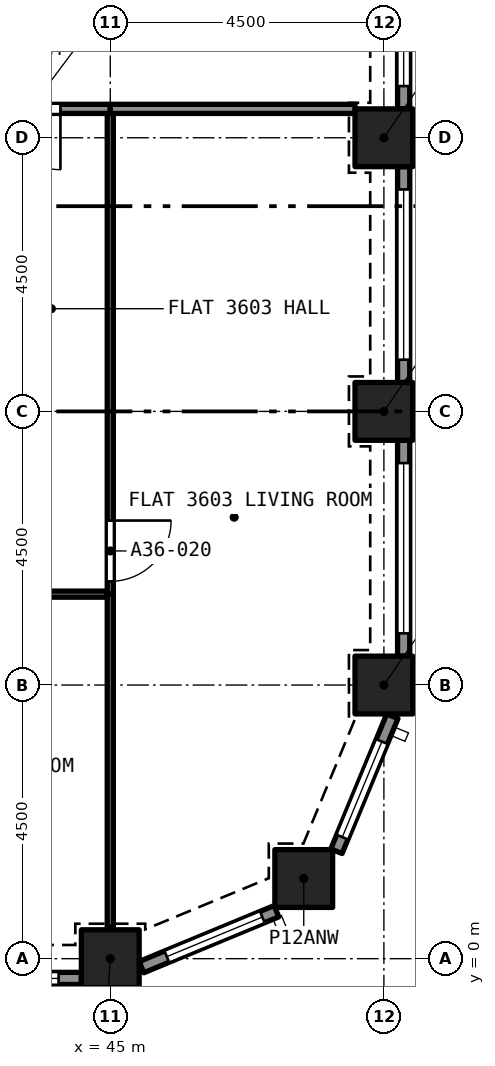
"""IFC4 building model, lengths in metres.
Left out: names, types, materials, properties, quantities, classifications, styles, units other than length and angle.
Written with IfcOpenShell. Run it as: python <this file> out.ifc"""

import sys

from ifc_helpers import new_model, si_unit, direction, frame, frame_2d, origin, origin_2d, place, context, subcontext, project, spatial, rectangle, extrude, element, fill, save


model = new_model("IFC4")
c1 = context("Model", 3, precision=1e-05, world=origin(), true_north=direction((0.0, 1.0)))
c2 = subcontext(c1, "Body", "Model", "MODEL_VIEW")
j1 = project(units=[si_unit("LENGTHUNIT", "METRE"), si_unit("PLANEANGLEUNIT", "RADIAN")], contexts=[c1])
p1 = place(None, origin())
s1 = spatial("IfcSite", under=j1, at=p1, CompositionType="ELEMENT")
p2 = place(p1, origin())
s2 = spatial("IfcBuilding", under=s1, at=p2, CompositionType="ELEMENT")
p3 = place(p2, frame((0.0, 0.0, 130.2)))
s3 = spatial("IfcBuildingStorey", under=s2, at=p3, CompositionType="ELEMENT", Elevation=130.2)
for number, where, z_axis, x_axis in (
    (1, (45.0, 0.0, 0.0), (0.0, 0.0, 1.0), (1.0, 0.0, 0.0)),
    (2, (48.182, 1.318, 0.0), (0.0, 0.0, 1.0), (1.0, 0.0, 0.0)),
    (3, (49.5, 4.5, 0.0), (0.0, 0.0, 1.0), (1.0, 0.0, 0.0)),
    (4, (49.5, 9.0, 0.0), (0.0, 0.0, 1.0), (1.0, 0.0, 0.0)),
    (5, (49.5, 13.5, 0.0), (0.0, 0.0, 1.0), (1.0, 0.0, 0.0)),
):
    element("IfcColumn", number, at=place(p3, frame(where, z_axis=z_axis, x_axis=x_axis)), inside=s3, PredefinedType="COLUMN", context=c2, shape_type="SweptSolid", body=[
        extrude(rectangle(XDim=0.95, YDim=0.95, at=origin_2d()), origin(), (0.0, 0.0, 1.0), 3.2),
    ])
p4 = place(p3, frame((44.525, -0.325, 0.0), z_axis=(0.0, 0.0, 1.0), x_axis=(-1.0, 0.0, 0.0)))
e6 = element("IfcWall", 6, at=p4, inside=s3, PredefinedType="SOLIDWALL", context=c2, shape_type="SweptSolid", body=[
    extrude(rectangle(XDim=3.55, YDim=0.2, at=frame_2d((1.775, 0.0))), origin(), (0.0, 0.0, 1.0), 3.2),
])
p5 = place(p4, frame((0.375, 0.0, 0.45)))
e7 = element("IfcOpeningElement", 7, at=p5, cuts=e6, PredefinedType="OPENING", context=c2, shape_type="SweptSolid", body=[
    extrude(rectangle(XDim=2.8, YDim=1.95, at=frame_2d((1.4, 0.975))), frame((0.0, 0.11, 0.0), z_axis=(0.0, -1.0, 0.0), x_axis=(1.0, 0.0, 0.0)), (0.0, 0.0, 1.0), 0.22),
])
p6 = place(p3, frame((47.733, 0.78, 0.0), z_axis=(0.0, 0.0, 1.0), x_axis=(-0.923880599843, -0.382680855588, 0.0)))
e8 = element("IfcWall", 8, at=p6, inside=s3, PredefinedType="SOLIDWALL", context=c2, shape_type="SweptSolid", body=[
    extrude(rectangle(XDim=2.403, YDim=0.2, at=frame_2d((1.201, 0.0))), origin(), (0.0, 0.0, 1.0), 3.2),
])
p7 = place(p6, frame((0.251, 0.0, 0.45)))
e9 = element("IfcOpeningElement", 9, at=p7, cuts=e8, PredefinedType="OPENING", context=c2, shape_type="SweptSolid", body=[
    extrude(rectangle(XDim=1.7, YDim=1.95, at=frame_2d((0.85, 0.975))), frame((0.0, 0.11, 0.0), z_axis=(0.0, -1.0, 0.0), x_axis=(1.0, 0.0, 0.0)), (0.0, 0.0, 1.0), 0.22),
])
p8 = place(p3, frame((49.639, 3.987, 0.0), z_axis=(0.0, 0.0, 1.0), x_axis=(-0.382680855588, -0.923880599843, 0.0)))
e10 = element("IfcWall", 10, at=p8, inside=s3, PredefinedType="SOLIDWALL", context=c2, shape_type="SweptSolid", body=[
    extrude(rectangle(XDim=2.403, YDim=0.2, at=frame_2d((1.201, 0.0))), origin(), (0.0, 0.0, 1.0), 3.2),
])
p9 = place(p8, frame((0.451, 0.0, 0.45)))
e11 = element("IfcOpeningElement", 11, at=p9, cuts=e10, PredefinedType="OPENING", context=c2, shape_type="SweptSolid", body=[
    extrude(rectangle(XDim=1.7, YDim=1.95, at=frame_2d((0.85, 0.975))), frame((0.0, 0.11, 0.0), z_axis=(0.0, -1.0, 0.0), x_axis=(1.0, 0.0, 0.0)), (0.0, 0.0, 1.0), 0.22),
])
p10 = place(p3, frame((49.825, 8.525, 0.0), z_axis=(0.0, 0.0, 1.0), x_axis=(0.0, -1.0, 0.0)))
e12 = element("IfcWall", 12, at=p10, inside=s3, PredefinedType="SOLIDWALL", context=c2, shape_type="SweptSolid", body=[
    extrude(rectangle(XDim=3.55, YDim=0.2, at=frame_2d((1.775, 0.0))), origin(), (0.0, 0.0, 1.0), 3.2),
])
p11 = place(p10, frame((0.375, 0.0, 0.45)))
e13 = element("IfcOpeningElement", 13, at=p11, cuts=e12, PredefinedType="OPENING", context=c2, shape_type="SweptSolid", body=[
    extrude(rectangle(XDim=2.8, YDim=1.95, at=frame_2d((1.4, 0.975))), frame((0.0, 0.11, 0.0), z_axis=(0.0, -1.0, 0.0), x_axis=(1.0, 0.0, 0.0)), (0.0, 0.0, 1.0), 0.22),
])
p12 = place(p3, frame((49.825, 13.025, 0.0), z_axis=(0.0, 0.0, 1.0), x_axis=(0.0, -1.0, 0.0)))
e14 = element("IfcWall", 14, at=p12, inside=s3, PredefinedType="SOLIDWALL", context=c2, shape_type="SweptSolid", body=[
    extrude(rectangle(XDim=3.55, YDim=0.2, at=frame_2d((1.775, 0.0))), origin(), (0.0, 0.0, 1.0), 3.2),
])
p13 = place(p12, frame((0.375, 0.0, 0.45)))
e15 = element("IfcOpeningElement", 15, at=p13, cuts=e14, PredefinedType="OPENING", context=c2, shape_type="SweptSolid", body=[
    extrude(rectangle(XDim=2.8, YDim=1.95, at=frame_2d((1.4, 0.975))), frame((0.0, 0.11, 0.0), z_axis=(0.0, -1.0, 0.0), x_axis=(1.0, 0.0, 0.0)), (0.0, 0.0, 1.0), 0.22),
])
p14 = place(p3, frame((49.825, 17.525, 0.0), z_axis=(0.0, 0.0, 1.0), x_axis=(0.0, -1.0, 0.0)))
e16 = element("IfcWall", 16, at=p14, inside=s3, PredefinedType="SOLIDWALL", context=c2, shape_type="SweptSolid", body=[
    extrude(rectangle(XDim=3.55, YDim=0.2, at=frame_2d((1.775, 0.0))), origin(), (0.0, 0.0, 1.0), 3.2),
])
p15 = place(p14, frame((0.375, 0.0, 0.45)))
e17 = element("IfcOpeningElement", 17, at=p15, cuts=e16, PredefinedType="OPENING", context=c2, shape_type="SweptSolid", body=[
    extrude(rectangle(XDim=2.8, YDim=1.95, at=frame_2d((1.4, 0.975))), frame((0.0, 0.11, 0.0), z_axis=(0.0, -1.0, 0.0), x_axis=(1.0, 0.0, 0.0)), (0.0, 0.0, 1.0), 0.22),
])
p16 = place(p3, frame((44.95, 5.995, 0.0), z_axis=(0.0, 0.0, 1.0), x_axis=(-1.0, 0.0, 0.0)))
e18 = element("IfcWall", 18, at=p16, inside=s3, PredefinedType="PARTITIONING", context=c2, shape_type="SweptSolid", body=[
    extrude(rectangle(XDim=4.35, YDim=0.1, at=frame_2d((2.175, 0.0))), origin(), (0.0, 0.0, 1.0), 2.9),
])
p17 = place(p16, frame((1.75, 0.0, 0.0)))
e19 = element("IfcOpeningElement", 19, at=p17, cuts=e18, PredefinedType="OPENING", context=c2, shape_type="SweptSolid", body=[
    extrude(rectangle(XDim=0.9, YDim=2.1, at=frame_2d((0.45, 1.05))), frame((0.0, 0.06, 0.0), z_axis=(0.0, -1.0, 0.0), x_axis=(1.0, 0.0, 0.0)), (0.0, 0.0, 1.0), 0.12),
])
p18 = place(p3, frame((45.0, 0.514, 0.0), z_axis=(0.0, 0.0, 1.0), x_axis=(0.0, 1.0, 0.0)))
e20 = element("IfcWall", 20, at=p18, inside=s3, PredefinedType="PARTITIONING", context=c2, shape_type="SweptSolid", body=[
    extrude(rectangle(XDim=5.481, YDim=0.1, at=frame_2d((2.74, 0.0))), origin(), (0.0, 0.0, 1.0), 2.9),
])
p19 = place(p3, frame((45.0, 13.9, 0.0), z_axis=(0.0, 0.0, 1.0), x_axis=(0.0, -1.0, 0.0)))
e21 = element("IfcWall", 21, at=p19, inside=s3, PredefinedType="PARTITIONING", context=c2, shape_type="SweptSolid", body=[
    extrude(rectangle(XDim=7.905, YDim=0.1, at=frame_2d((3.952, 0.0))), origin(), (0.0, 0.0, 1.0), 2.9),
])
p20 = place(p19, frame((6.695, 0.0, 0.0)))
e22 = element("IfcOpeningElement", 22, at=p20, cuts=e21, PredefinedType="OPENING", context=c2, shape_type="SweptSolid", body=[
    extrude(rectangle(XDim=1.0, YDim=2.1, at=frame_2d((0.5, 1.05))), frame((0.0, 0.06, 0.0), z_axis=(0.0, -1.0, 0.0), x_axis=(1.0, 0.0, 0.0)), (0.0, 0.0, 1.0), 0.12),
])
p21 = place(p3, frame((45.0, 13.975, 0.0), z_axis=(0.0, 0.0, 1.0), x_axis=(-1.0, 0.0, 0.0)))
e23 = element("IfcWall", 23, at=p21, inside=s3, PredefinedType="PARTITIONING", context=c2, shape_type="SweptSolid", body=[
    extrude(rectangle(XDim=1.95, YDim=0.15, at=frame_2d((0.975, 0.0))), origin(), (0.0, 0.0, 1.0), 2.9),
])
p22 = place(p21, frame((0.82, 0.0, 0.0)))
e24 = element("IfcOpeningElement", 24, at=p22, cuts=e23, PredefinedType="OPENING", context=c2, shape_type="SweptSolid", body=[
    extrude(rectangle(XDim=1.0, YDim=2.1, at=frame_2d((0.5, 1.05))), frame((0.0, 0.085, 0.0), z_axis=(0.0, -1.0, 0.0), x_axis=(1.0, 0.0, 0.0)), (0.0, 0.0, 1.0), 0.17),
])
p23 = place(p3, frame((45.0, 13.975, 0.0), z_axis=(0.0, 0.0, 1.0), x_axis=(1.0, 0.0, 0.0)))
e25 = element("IfcWall", 25, at=p23, inside=s3, PredefinedType="PARTITIONING", context=c2, shape_type="SweptSolid", body=[
    extrude(rectangle(XDim=4.025, YDim=0.15, at=frame_2d((2.012, 0.0))), origin(), (0.0, 0.0, 1.0), 2.9),
])
p24 = place(p5, origin())
e26 = element("IfcWindow", 26, at=p24, inside=s3, PartitioningType="SINGLE_PANEL", PredefinedType="WINDOW", context=c2, shape_type="SweptSolid", body=[
    extrude(rectangle(XDim=2.8, YDim=1.95, at=frame_2d((1.4, 0.975))), frame((0.0, 0.03, 0.0), z_axis=(0.0, -1.0, 0.0), x_axis=(1.0, 0.0, 0.0)), (0.0, 0.0, 1.0), 0.06),
])
fill(e7, e26)
p25 = place(p7, origin())
e27 = element("IfcWindow", 27, at=p25, inside=s3, PartitioningType="SINGLE_PANEL", PredefinedType="WINDOW", context=c2, shape_type="SweptSolid", body=[
    extrude(rectangle(XDim=1.7, YDim=1.95, at=frame_2d((0.85, 0.975))), frame((0.0, 0.03, 0.0), z_axis=(0.0, -1.0, 0.0), x_axis=(1.0, 0.0, 0.0)), (0.0, 0.0, 1.0), 0.06),
])
fill(e9, e27)
p26 = place(p9, origin())
e28 = element("IfcWindow", 28, at=p26, inside=s3, PartitioningType="SINGLE_PANEL", PredefinedType="WINDOW", context=c2, shape_type="SweptSolid", body=[
    extrude(rectangle(XDim=1.7, YDim=1.95, at=frame_2d((0.85, 0.975))), frame((0.0, 0.03, 0.0), z_axis=(0.0, -1.0, 0.0), x_axis=(1.0, 0.0, 0.0)), (0.0, 0.0, 1.0), 0.06),
])
fill(e11, e28)
p27 = place(p11, origin())
e29 = element("IfcWindow", 29, at=p27, inside=s3, PartitioningType="SINGLE_PANEL", PredefinedType="WINDOW", context=c2, shape_type="SweptSolid", body=[
    extrude(rectangle(XDim=2.8, YDim=1.95, at=frame_2d((1.4, 0.975))), frame((0.0, 0.03, 0.0), z_axis=(0.0, -1.0, 0.0), x_axis=(1.0, 0.0, 0.0)), (0.0, 0.0, 1.0), 0.06),
])
fill(e13, e29)
p28 = place(p13, origin())
e30 = element("IfcWindow", 30, at=p28, inside=s3, PartitioningType="SINGLE_PANEL", PredefinedType="WINDOW", context=c2, shape_type="SweptSolid", body=[
    extrude(rectangle(XDim=2.8, YDim=1.95, at=frame_2d((1.4, 0.975))), frame((0.0, 0.03, 0.0), z_axis=(0.0, -1.0, 0.0), x_axis=(1.0, 0.0, 0.0)), (0.0, 0.0, 1.0), 0.06),
])
fill(e15, e30)
p29 = place(p15, origin())
e31 = element("IfcWindow", 31, at=p29, inside=s3, PartitioningType="SINGLE_PANEL", PredefinedType="WINDOW", context=c2, shape_type="SweptSolid", body=[
    extrude(rectangle(XDim=2.8, YDim=1.95, at=frame_2d((1.4, 0.975))), frame((0.0, 0.03, 0.0), z_axis=(0.0, -1.0, 0.0), x_axis=(1.0, 0.0, 0.0)), (0.0, 0.0, 1.0), 0.06),
])
fill(e17, e31)
p30 = place(p20, origin())
e32 = element("IfcDoor", 32, at=p30, inside=s3, OperationType="SINGLE_SWING_RIGHT", PredefinedType="DOOR", context=c2, shape_type="SweptSolid", body=[
    extrude(rectangle(XDim=1.0, YDim=2.1, at=frame_2d((0.5, 1.05))), frame((0.0, 0.025, 0.0), z_axis=(0.0, -1.0, 0.0), x_axis=(1.0, 0.0, 0.0)), (0.0, 0.0, 1.0), 0.05),
])
fill(e22, e32)
p31 = place(p22, origin())
e33 = element("IfcDoor", 33, at=p31, inside=s3, OperationType="SINGLE_SWING_RIGHT", PredefinedType="DOOR", context=c2, shape_type="SweptSolid", body=[
    extrude(rectangle(XDim=1.0, YDim=2.1, at=frame_2d((0.5, 1.05))), frame((0.0, 0.025, 0.0), z_axis=(0.0, -1.0, 0.0), x_axis=(1.0, 0.0, 0.0)), (0.0, 0.0, 1.0), 0.05),
])
fill(e24, e33)
save(model, sys.argv[1])
